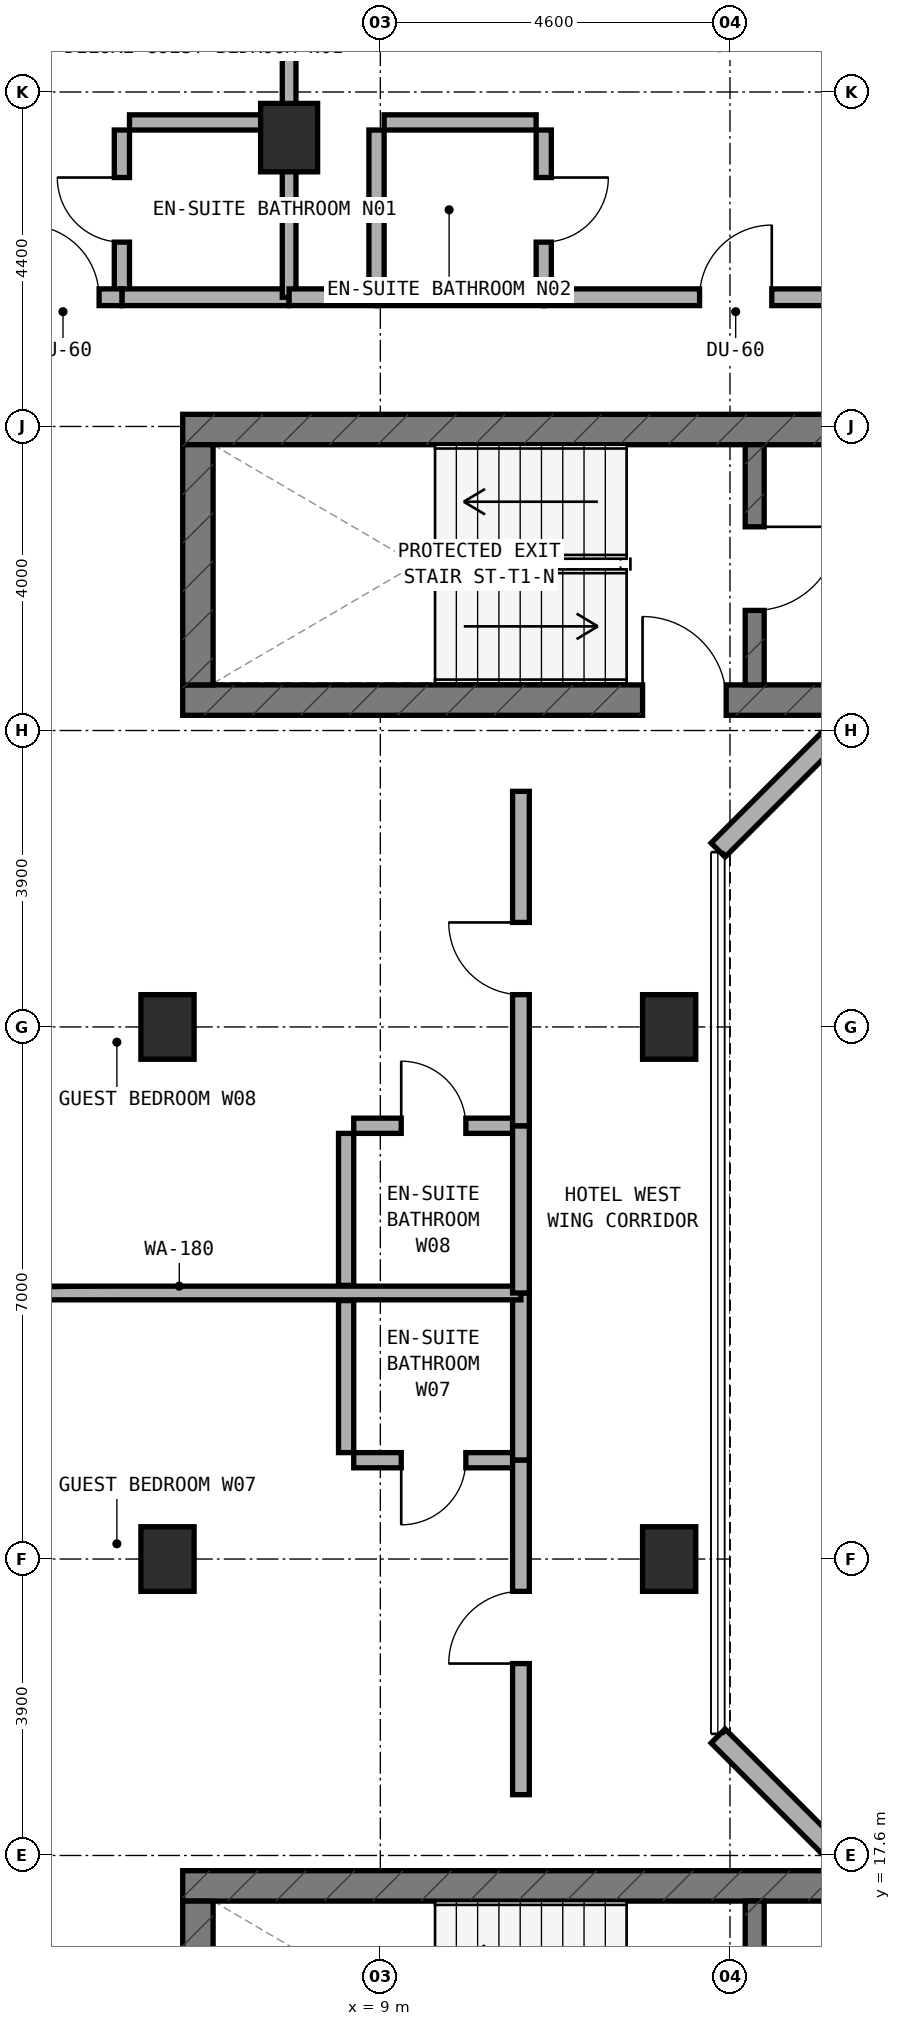
"""IFC4 building model, lengths in metres.
Left out: names, types, materials, properties, quantities, classifications, styles, units other than length and angle.
Written with IfcOpenShell. Run it as: python <this file> out.ifc"""

import sys

from ifc_helpers import new_model, si_unit, direction, frame, frame_2d, origin, origin_2d, place, context, subcontext, project, spatial, rectangle, extrude, element, fill, save


model = new_model("IFC4")
c1 = context("Model", 3, precision=1e-05, world=origin(), true_north=direction((0.0, 1.0)))
c2 = subcontext(c1, "Body", "Model", "MODEL_VIEW")
j1 = project(units=[si_unit("LENGTHUNIT", "METRE"), si_unit("PLANEANGLEUNIT", "RADIAN")], contexts=[c1])
p1 = place(None, origin())
s1 = spatial("IfcSite", under=j1, at=p1, CompositionType="ELEMENT")
p2 = place(p1, origin())
s2 = spatial("IfcBuilding", under=s1, at=p2, CompositionType="ELEMENT")
p3 = place(p2, frame((0.0, 0.0, 220.7)))
s3 = spatial("IfcBuildingStorey", under=s2, at=p3, CompositionType="ELEMENT", Elevation=220.7)
p4 = place(p3, frame((6.4, 32.8, 0.0), z_axis=(0.0, 0.0, 1.0), x_axis=(1.0, 0.0, 0.0)))
e1 = element("IfcWall", 1, at=p4, inside=s3, PredefinedType="SHEAR", context=c2, shape_type="SweptSolid", body=[
    extrude(rectangle(XDim=24.4, YDim=0.4, at=frame_2d((12.2, 0.0))), origin(), (0.0, 0.0, 1.0), 3.6),
])
p5 = place(p4, frame((6.05, 0.0, 0.0)))
e2 = element("IfcOpeningElement", 2, at=p5, cuts=e1, PredefinedType="OPENING", context=c2, shape_type="SweptSolid", body=[
    extrude(rectangle(XDim=1.1, YDim=2.15, at=frame_2d((0.55, 1.075))), frame((0.0, 0.21, 0.0), z_axis=(0.0, -1.0, 0.0), x_axis=(1.0, 0.0, 0.0)), (0.0, 0.0, 1.0), 0.42),
])
p6 = place(p3, frame((6.4, 36.36, 0.0), z_axis=(0.0, 0.0, 1.0), x_axis=(1.0, 0.0, 0.0)))
e3 = element("IfcWall", 3, at=p6, inside=s3, PredefinedType="SHEAR", context=c2, shape_type="SweptSolid", body=[
    extrude(rectangle(XDim=24.4, YDim=0.4, at=frame_2d((12.2, 0.0))), origin(), (0.0, 0.0, 1.0), 3.6),
])
p7 = place(p6, frame((9.15, 0.0, 0.0)))
e4 = element("IfcOpeningElement", 4, at=p7, cuts=e3, PredefinedType="OPENING", context=c2, shape_type="SweptSolid", body=[
    extrude(rectangle(XDim=1.2, YDim=2.15, at=frame_2d((0.6, 1.075))), frame((0.0, 0.21, 0.0), z_axis=(0.0, -1.0, 0.0), x_axis=(1.0, 0.0, 0.0)), (0.0, 0.0, 1.0), 0.42),
])
p8 = place(p6, frame((19.2, 0.0, 0.0)))
e5 = element("IfcOpeningElement", 5, at=p8, cuts=e3, PredefinedType="OPENING", context=c2, shape_type="SweptSolid", body=[
    extrude(rectangle(XDim=0.85, YDim=2.1, at=frame_2d((0.425, 1.05))), frame((0.0, 0.21, 0.0), z_axis=(0.0, -1.0, 0.0), x_axis=(1.0, 0.0, 0.0)), (0.0, 0.0, 1.0), 0.42),
])
p9 = place(p6, frame((16.94, 0.0, 0.0)))
e6 = element("IfcOpeningElement", 6, at=p9, cuts=e3, PredefinedType="OPENING", context=c2, shape_type="SweptSolid", body=[
    extrude(rectangle(XDim=0.85, YDim=2.1, at=frame_2d((0.425, 1.05))), frame((0.0, 0.21, 0.0), z_axis=(0.0, -1.0, 0.0), x_axis=(1.0, 0.0, 0.0)), (0.0, 0.0, 1.0), 0.42),
])
p10 = place(p3, frame((6.6, 33.0, 0.0), z_axis=(0.0, 0.0, 1.0), x_axis=(0.0, 1.0, 0.0)))
e7 = element("IfcWall", 7, at=p10, inside=s3, PredefinedType="SHEAR", context=c2, shape_type="SweptSolid", body=[
    extrude(rectangle(XDim=3.16, YDim=0.4, at=frame_2d((1.58, 0.0))), origin(), (0.0, 0.0, 1.0), 3.6),
])
p11 = place(p3, frame((13.925, 33.0, 0.0), z_axis=(0.0, 0.0, 1.0), x_axis=(0.0, 1.0, 0.0)))
e8 = element("IfcWall", 8, at=p11, inside=s3, PredefinedType="STANDARD", context=c2, shape_type="SweptSolid", body=[
    extrude(rectangle(XDim=3.16, YDim=0.25, at=frame_2d((1.58, 0.0))), origin(), (0.0, 0.0, 1.0), 3.32),
])
p12 = place(p11, frame((0.98, 0.0, 0.0)))
e9 = element("IfcOpeningElement", 9, at=p12, cuts=e8, PredefinedType="OPENING", context=c2, shape_type="SweptSolid", body=[
    extrude(rectangle(XDim=1.1, YDim=2.15, at=frame_2d((0.55, 1.075))), frame((0.0, 0.135, 0.0), z_axis=(0.0, -1.0, 0.0), x_axis=(1.0, 0.0, 0.0)), (0.0, 0.0, 1.0), 0.27),
])
p13 = place(p3, frame((6.4, 17.2, 0.0), z_axis=(0.0, 0.0, 1.0), x_axis=(1.0, 0.0, 0.0)))
e10 = element("IfcWall", 10, at=p13, inside=s3, PredefinedType="SHEAR", context=c2, shape_type="SweptSolid", body=[
    extrude(rectangle(XDim=24.4, YDim=0.4, at=frame_2d((12.2, 0.0))), origin(), (0.0, 0.0, 1.0), 3.6),
])
p14 = place(p3, frame((6.6, 13.84, 0.0), z_axis=(0.0, 0.0, 1.0), x_axis=(0.0, 1.0, 0.0)))
e11 = element("IfcWall", 11, at=p14, inside=s3, PredefinedType="SHEAR", context=c2, shape_type="SweptSolid", body=[
    extrude(rectangle(XDim=3.16, YDim=0.4, at=frame_2d((1.58, 0.0))), origin(), (0.0, 0.0, 1.0), 3.6),
])
p15 = place(p3, frame((13.925, 13.84, 0.0), z_axis=(0.0, 0.0, 1.0), x_axis=(0.0, 1.0, 0.0)))
e12 = element("IfcWall", 12, at=p15, inside=s3, PredefinedType="STANDARD", context=c2, shape_type="SweptSolid", body=[
    extrude(rectangle(XDim=3.16, YDim=0.25, at=frame_2d((1.58, 0.0))), origin(), (0.0, 0.0, 1.0), 3.32),
])
p16 = place(p15, frame((0.98, 0.0, 0.0)))
e13 = element("IfcOpeningElement", 13, at=p16, cuts=e12, PredefinedType="OPENING", context=c2, shape_type="SweptSolid", body=[
    extrude(rectangle(XDim=1.1, YDim=2.15, at=frame_2d((0.55, 1.075))), frame((0.0, 0.135, 0.0), z_axis=(0.0, -1.0, 0.0), x_axis=(1.0, 0.0, 0.0)), (0.0, 0.0, 1.0), 0.27),
])
for number, where, z_axis, x_axis in (
    (14, (6.2, 21.5, 0.0), (0.0, 0.0, 1.0), (1.0, 0.0, 0.0)),
    (15, (6.2, 28.5, 0.0), (0.0, 0.0, 1.0), (1.0, 0.0, 0.0)),
):
    element("IfcColumn", number, at=place(p3, frame(where, z_axis=z_axis, x_axis=x_axis)), inside=s3, PredefinedType="COLUMN", context=c2, shape_type="SweptSolid", body=[
        extrude(rectangle(XDim=0.7, YDim=0.85, at=origin_2d()), origin(), (0.0, 0.0, 1.0), 3.6),
    ])
p17 = place(p3, frame((7.8, 40.2, 0.0), z_axis=(0.0, 0.0, 1.0), x_axis=(1.0, 0.0, 0.0)))
e16 = element("IfcColumn", 16, at=p17, inside=s3, PredefinedType="COLUMN", context=c2, shape_type="SweptSolid", body=[
    extrude(rectangle(XDim=0.75, YDim=0.9, at=origin_2d()), origin(), (0.0, 0.0, 1.0), 3.6),
])
for number, where, z_axis, x_axis in (
    (17, (12.8, 21.5, 0.0), (0.0, 0.0, 1.0), (1.0, 0.0, 0.0)),
    (18, (12.8, 28.5, 0.0), (0.0, 0.0, 1.0), (1.0, 0.0, 0.0)),
):
    element("IfcColumn", number, at=place(p3, frame(where, z_axis=z_axis, x_axis=x_axis)), inside=s3, PredefinedType="COLUMN", context=c2, shape_type="SweptSolid", body=[
        extrude(rectangle(XDim=0.7, YDim=0.85, at=origin_2d()), origin(), (0.0, 0.0, 1.0), 3.6),
    ])
for number, where, z_axis, x_axis in (
    (19, (15.278, 32.662, 0.0), (0.0, 0.0, 1.0), (-0.707, -0.707, 0.0)),
    (20, (13.444, 19.172, 0.0), (0.0, 0.0, 1.0), (0.707, -0.707, 0.0)),
):
    element("IfcWall", number, at=place(p3, frame(where, z_axis=z_axis, x_axis=x_axis)), inside=s3, PredefinedType="STANDARD", context=c2, shape_type="SweptSolid", body=[
        extrude(rectangle(XDim=2.594, YDim=0.26, at=frame_2d((1.297, 0.0))), origin(), (0.0, 0.0, 1.0), 3.32),
    ])
p18 = place(p3, frame((5.6, 38.2, 0.0), z_axis=(0.0, 0.0, 1.0), x_axis=(0.0, 1.0, 0.0)))
e21 = element("IfcWall", 21, at=p18, inside=s3, PredefinedType="PLUMBINGWALL", context=c2, shape_type="SweptSolid", body=[
    extrude(rectangle(XDim=2.1, YDim=0.2, at=frame_2d((1.05, 0.0))), origin(), (0.0, 0.0, 1.0), 3.32),
])
p19 = place(p18, frame((0.625, 0.0, 0.0)))
e22 = element("IfcOpeningElement", 22, at=p19, cuts=e21, PredefinedType="OPENING", context=c2, shape_type="SweptSolid", body=[
    extrude(rectangle(XDim=0.85, YDim=2.1, at=frame_2d((0.425, 1.05))), frame((0.0, 0.11, 0.0), z_axis=(0.0, -1.0, 0.0), x_axis=(1.0, 0.0, 0.0)), (0.0, 0.0, 1.0), 0.22),
])
p20 = place(p3, frame((5.7, 40.4, 0.0), z_axis=(0.0, 0.0, 1.0), x_axis=(1.0, 0.0, 0.0)))
e23 = element("IfcWall", 23, at=p20, inside=s3, PredefinedType="PLUMBINGWALL", context=c2, shape_type="SweptSolid", body=[
    extrude(rectangle(XDim=2.0, YDim=0.2, at=frame_2d((1.0, 0.0))), origin(), (0.0, 0.0, 1.0), 3.32),
])
p21 = place(p3, frame((5.6, 38.1, 0.0), z_axis=(0.0, 0.0, 1.0), x_axis=(1.0, 0.0, 0.0)))
e24 = element("IfcWall", 24, at=p21, inside=s3, PredefinedType="SOLIDWALL", context=c2, shape_type="SweptSolid", body=[
    extrude(rectangle(XDim=2.2, YDim=0.22, at=frame_2d((1.1, 0.0))), origin(), (0.0, 0.0, 1.0), 2.695),
])
p22 = place(p3, frame((1.96, 38.1, 0.0), z_axis=(0.0, 0.0, 1.0), x_axis=(1.0, 0.0, 0.0)))
e25 = element("IfcWall", 25, at=p22, inside=s3, PredefinedType="SOLIDWALL", context=c2, shape_type="SweptSolid", body=[
    extrude(rectangle(XDim=3.64, YDim=0.22, at=frame_2d((1.82, 0.0))), origin(), (0.0, 0.0, 1.0), 3.32),
])
p23 = place(p22, frame((2.39, 0.0, 0.0)))
e26 = element("IfcOpeningElement", 26, at=p23, cuts=e25, PredefinedType="OPENING", context=c2, shape_type="SweptSolid", body=[
    extrude(rectangle(XDim=0.95, YDim=2.1, at=frame_2d((0.475, 1.05))), frame((0.0, 0.12, 0.0), z_axis=(0.0, -1.0, 0.0), x_axis=(1.0, 0.0, 0.0)), (0.0, 0.0, 1.0), 0.24),
])
p24 = place(p3, frame((7.8, 38.1, 0.0), z_axis=(0.0, 0.0, 1.0), x_axis=(0.0, 1.0, 0.0)))
e27 = element("IfcWall", 27, at=p24, inside=s3, PredefinedType="SOLIDWALL", context=c2, shape_type="SweptSolid", body=[
    extrude(rectangle(XDim=4.558, YDim=0.18, at=frame_2d((2.279, 0.0))), origin(), (0.0, 0.0, 1.0), 2.695),
])
p25 = place(p3, frame((11.15, 38.2, 0.0), z_axis=(0.0, 0.0, 1.0), x_axis=(0.0, 1.0, 0.0)))
e28 = element("IfcWall", 28, at=p25, inside=s3, PredefinedType="PLUMBINGWALL", context=c2, shape_type="SweptSolid", body=[
    extrude(rectangle(XDim=2.1, YDim=0.2, at=frame_2d((1.05, 0.0))), origin(), (0.0, 0.0, 1.0), 3.015),
])
p26 = place(p25, frame((0.625, 0.0, 0.0)))
e29 = element("IfcOpeningElement", 29, at=p26, cuts=e28, PredefinedType="OPENING", context=c2, shape_type="SweptSolid", body=[
    extrude(rectangle(XDim=0.85, YDim=2.1, at=frame_2d((0.425, 1.05))), frame((0.0, 0.11, 0.0), z_axis=(0.0, -1.0, 0.0), x_axis=(1.0, 0.0, 0.0)), (0.0, 0.0, 1.0), 0.22),
])
p27 = place(p3, frame((9.05, 40.4, 0.0), z_axis=(0.0, 0.0, 1.0), x_axis=(1.0, 0.0, 0.0)))
e30 = element("IfcWall", 30, at=p27, inside=s3, PredefinedType="PLUMBINGWALL", context=c2, shape_type="SweptSolid", body=[
    extrude(rectangle(XDim=2.0, YDim=0.2, at=frame_2d((1.0, 0.0))), origin(), (0.0, 0.0, 1.0), 3.015),
])
p28 = place(p3, frame((8.95, 38.2, 0.0), z_axis=(0.0, 0.0, 1.0), x_axis=(0.0, 1.0, 0.0)))
e31 = element("IfcWall", 31, at=p28, inside=s3, PredefinedType="PLUMBINGWALL", context=c2, shape_type="SweptSolid", body=[
    extrude(rectangle(XDim=2.1, YDim=0.2, at=frame_2d((1.05, 0.0))), origin(), (0.0, 0.0, 1.0), 3.015),
])
p29 = place(p3, frame((7.8, 38.1, 0.0), z_axis=(0.0, 0.0, 1.0), x_axis=(1.0, 0.0, 0.0)))
e32 = element("IfcWall", 32, at=p29, inside=s3, PredefinedType="SOLIDWALL", context=c2, shape_type="SweptSolid", body=[
    extrude(rectangle(XDim=1.15, YDim=0.22, at=frame_2d((0.575, 0.0))), origin(), (0.0, 0.0, 1.0), 2.695),
])
p30 = place(p3, frame((8.95, 38.1, 0.0), z_axis=(0.0, 0.0, 1.0), x_axis=(1.0, 0.0, 0.0)))
e33 = element("IfcWall", 33, at=p30, inside=s3, PredefinedType="SOLIDWALL", context=c2, shape_type="SweptSolid", body=[
    extrude(rectangle(XDim=2.2, YDim=0.22, at=frame_2d((1.1, 0.0))), origin(), (0.0, 0.0, 1.0), 3.32),
])
p31 = place(p3, frame((11.15, 38.1, 0.0), z_axis=(0.0, 0.0, 1.0), x_axis=(1.0, 0.0, 0.0)))
e34 = element("IfcWall", 34, at=p31, inside=s3, PredefinedType="SOLIDWALL", context=c2, shape_type="SweptSolid", body=[
    extrude(rectangle(XDim=5.05, YDim=0.22, at=frame_2d((2.525, 0.0))), origin(), (0.0, 0.0, 1.0), 2.695),
])
p32 = place(p31, frame((2.05, 0.0, 0.0)))
e35 = element("IfcOpeningElement", 35, at=p32, cuts=e34, PredefinedType="OPENING", context=c2, shape_type="SweptSolid", body=[
    extrude(rectangle(XDim=0.95, YDim=2.1, at=frame_2d((0.475, 1.05))), frame((0.0, 0.12, 0.0), z_axis=(0.0, -1.0, 0.0), x_axis=(1.0, 0.0, 0.0)), (0.0, 0.0, 1.0), 0.24),
])
p33 = place(p3, frame((8.65, 22.8, 0.0), z_axis=(0.0, 0.0, 1.0), x_axis=(1.0, 0.0, 0.0)))
e36 = element("IfcWall", 36, at=p33, inside=s3, PredefinedType="PLUMBINGWALL", context=c2, shape_type="SweptSolid", body=[
    extrude(rectangle(XDim=2.1, YDim=0.2, at=frame_2d((1.05, 0.0))), origin(), (0.0, 0.0, 1.0), 3.32),
])
p34 = place(p33, frame((0.625, 0.0, 0.0)))
e37 = element("IfcOpeningElement", 37, at=p34, cuts=e36, PredefinedType="OPENING", context=c2, shape_type="SweptSolid", body=[
    extrude(rectangle(XDim=0.85, YDim=2.1, at=frame_2d((0.425, 1.05))), frame((0.0, 0.11, 0.0), z_axis=(0.0, -1.0, 0.0), x_axis=(1.0, 0.0, 0.0)), (0.0, 0.0, 1.0), 0.22),
])
p35 = place(p3, frame((8.55, 22.9, 0.0), z_axis=(0.0, 0.0, 1.0), x_axis=(0.0, 1.0, 0.0)))
e38 = element("IfcWall", 38, at=p35, inside=s3, PredefinedType="PLUMBINGWALL", context=c2, shape_type="SweptSolid", body=[
    extrude(rectangle(XDim=2.0, YDim=0.2, at=frame_2d((1.0, 0.0))), origin(), (0.0, 0.0, 1.0), 3.32),
])
p36 = place(p3, frame((10.85, 22.8, 0.0), z_axis=(0.0, 0.0, 1.0), x_axis=(0.0, 1.0, 0.0)))
e39 = element("IfcWall", 39, at=p36, inside=s3, PredefinedType="SOLIDWALL", context=c2, shape_type="SweptSolid", body=[
    extrude(rectangle(XDim=2.2, YDim=0.22, at=frame_2d((1.1, 0.0))), origin(), (0.0, 0.0, 1.0), 3.32),
])
p37 = place(p3, frame((10.85, 18.4, 0.0), z_axis=(0.0, 0.0, 1.0), x_axis=(0.0, 1.0, 0.0)))
e40 = element("IfcWall", 40, at=p37, inside=s3, PredefinedType="SOLIDWALL", context=c2, shape_type="SweptSolid", body=[
    extrude(rectangle(XDim=4.4, YDim=0.22, at=frame_2d((2.2, 0.0))), origin(), (0.0, 0.0, 1.0), 2.695),
])
p38 = place(p37, frame((1.725, 0.0, 0.0)))
e41 = element("IfcOpeningElement", 41, at=p38, cuts=e40, PredefinedType="OPENING", context=c2, shape_type="SweptSolid", body=[
    extrude(rectangle(XDim=0.95, YDim=2.1, at=frame_2d((0.475, 1.05))), frame((0.0, 0.12, 0.0), z_axis=(0.0, -1.0, 0.0), x_axis=(1.0, 0.0, 0.0)), (0.0, 0.0, 1.0), 0.24),
])
p39 = place(p3, frame((1.86, 25.0, 0.0), z_axis=(0.0, 0.0, 1.0), x_axis=(1.0, 0.0, 0.0)))
e42 = element("IfcWall", 42, at=p39, inside=s3, PredefinedType="SOLIDWALL", context=c2, shape_type="SweptSolid", body=[
    extrude(rectangle(XDim=8.99, YDim=0.18, at=frame_2d((4.495, 0.0))), origin(), (0.0, 0.0, 1.0), 3.015),
])
p40 = place(p3, frame((8.65, 27.2, 0.0), z_axis=(0.0, 0.0, 1.0), x_axis=(1.0, 0.0, 0.0)))
e43 = element("IfcWall", 43, at=p40, inside=s3, PredefinedType="PLUMBINGWALL", context=c2, shape_type="SweptSolid", body=[
    extrude(rectangle(XDim=2.1, YDim=0.2, at=frame_2d((1.05, 0.0))), origin(), (0.0, 0.0, 1.0), 3.32),
])
p41 = place(p40, frame((0.625, 0.0, 0.0)))
e44 = element("IfcOpeningElement", 44, at=p41, cuts=e43, PredefinedType="OPENING", context=c2, shape_type="SweptSolid", body=[
    extrude(rectangle(XDim=0.85, YDim=2.1, at=frame_2d((0.425, 1.05))), frame((0.0, 0.11, 0.0), z_axis=(0.0, -1.0, 0.0), x_axis=(1.0, 0.0, 0.0)), (0.0, 0.0, 1.0), 0.22),
])
p42 = place(p3, frame((8.55, 25.1, 0.0), z_axis=(0.0, 0.0, 1.0), x_axis=(0.0, 1.0, 0.0)))
e45 = element("IfcWall", 45, at=p42, inside=s3, PredefinedType="PLUMBINGWALL", context=c2, shape_type="SweptSolid", body=[
    extrude(rectangle(XDim=2.0, YDim=0.2, at=frame_2d((1.0, 0.0))), origin(), (0.0, 0.0, 1.0), 3.32),
])
p43 = place(p3, frame((10.85, 25.0, 0.0), z_axis=(0.0, 0.0, 1.0), x_axis=(0.0, 1.0, 0.0)))
e46 = element("IfcWall", 46, at=p43, inside=s3, PredefinedType="SOLIDWALL", context=c2, shape_type="SweptSolid", body=[
    extrude(rectangle(XDim=2.2, YDim=0.22, at=frame_2d((1.1, 0.0))), origin(), (0.0, 0.0, 1.0), 3.32),
])
p44 = place(p3, frame((10.85, 27.2, 0.0), z_axis=(0.0, 0.0, 1.0), x_axis=(0.0, 1.0, 0.0)))
e47 = element("IfcWall", 47, at=p44, inside=s3, PredefinedType="SOLIDWALL", context=c2, shape_type="SweptSolid", body=[
    extrude(rectangle(XDim=4.4, YDim=0.22, at=frame_2d((2.2, 0.0))), origin(), (0.0, 0.0, 1.0), 2.695),
])
p45 = place(p44, frame((1.725, 0.0, 0.0)))
e48 = element("IfcOpeningElement", 48, at=p45, cuts=e47, PredefinedType="OPENING", context=c2, shape_type="SweptSolid", body=[
    extrude(rectangle(XDim=0.95, YDim=2.1, at=frame_2d((0.475, 1.05))), frame((0.0, 0.12, 0.0), z_axis=(0.0, -1.0, 0.0), x_axis=(1.0, 0.0, 0.0)), (0.0, 0.0, 1.0), 0.24),
])
p46 = place(p12, frame((1.1, 0.0, 0.0), z_axis=(0.0, 0.0, 1.0), x_axis=(-1.0, 0.0, 0.0)))
e49 = element("IfcDoor", 49, at=p46, inside=s3, OperationType="SINGLE_SWING_LEFT", PredefinedType="DOOR", context=c2, shape_type="SweptSolid", body=[
    extrude(rectangle(XDim=1.1, YDim=2.15, at=frame_2d((0.55, 1.075))), frame((0.0, 0.025, 0.0), z_axis=(0.0, -1.0, 0.0), x_axis=(1.0, 0.0, 0.0)), (0.0, 0.0, 1.0), 0.05),
])
fill(e9, e49)
p47 = place(p5, origin())
e50 = element("IfcDoor", 50, at=p47, inside=s3, OperationType="SINGLE_SWING_LEFT", PredefinedType="DOOR", context=c2, shape_type="SweptSolid", body=[
    extrude(rectangle(XDim=1.1, YDim=2.15, at=frame_2d((0.55, 1.075))), frame((0.0, 0.025, 0.0), z_axis=(0.0, -1.0, 0.0), x_axis=(1.0, 0.0, 0.0)), (0.0, 0.0, 1.0), 0.05),
])
fill(e2, e50)
p48 = place(p19, origin())
e51 = element("IfcDoor", 51, at=p48, inside=s3, OperationType="SINGLE_SWING_RIGHT", PredefinedType="DOOR", context=c2, shape_type="SweptSolid", body=[
    extrude(rectangle(XDim=0.85, YDim=2.1, at=frame_2d((0.425, 1.05))), frame((0.0, 0.025, 0.0), z_axis=(0.0, -1.0, 0.0), x_axis=(1.0, 0.0, 0.0)), (0.0, 0.0, 1.0), 0.05),
])
fill(e22, e51)
p49 = place(p23, origin())
e52 = element("IfcDoor", 52, at=p49, inside=s3, OperationType="SINGLE_SWING_LEFT", PredefinedType="DOOR", context=c2, shape_type="SweptSolid", body=[
    extrude(rectangle(XDim=0.95, YDim=2.1, at=frame_2d((0.475, 1.05))), frame((0.0, 0.025, 0.0), z_axis=(0.0, -1.0, 0.0), x_axis=(1.0, 0.0, 0.0)), (0.0, 0.0, 1.0), 0.05),
])
fill(e26, e52)
p50 = place(p26, frame((0.85, 0.0, 0.0), z_axis=(0.0, 0.0, 1.0), x_axis=(-1.0, 0.0, 0.0)))
e53 = element("IfcDoor", 53, at=p50, inside=s3, OperationType="SINGLE_SWING_LEFT", PredefinedType="DOOR", context=c2, shape_type="SweptSolid", body=[
    extrude(rectangle(XDim=0.85, YDim=2.1, at=frame_2d((0.425, 1.05))), frame((0.0, 0.025, 0.0), z_axis=(0.0, -1.0, 0.0), x_axis=(1.0, 0.0, 0.0)), (0.0, 0.0, 1.0), 0.05),
])
fill(e29, e53)
p51 = place(p32, origin())
e54 = element("IfcDoor", 54, at=p51, inside=s3, OperationType="SINGLE_SWING_RIGHT", PredefinedType="DOOR", context=c2, shape_type="SweptSolid", body=[
    extrude(rectangle(XDim=0.95, YDim=2.1, at=frame_2d((0.475, 1.05))), frame((0.0, 0.025, 0.0), z_axis=(0.0, -1.0, 0.0), x_axis=(1.0, 0.0, 0.0)), (0.0, 0.0, 1.0), 0.05),
])
fill(e35, e54)
p52 = place(p34, frame((0.85, 0.0, 0.0), z_axis=(0.0, 0.0, 1.0), x_axis=(-1.0, 0.0, 0.0)))
e55 = element("IfcDoor", 55, at=p52, inside=s3, OperationType="SINGLE_SWING_RIGHT", PredefinedType="DOOR", context=c2, shape_type="SweptSolid", body=[
    extrude(rectangle(XDim=0.85, YDim=2.1, at=frame_2d((0.425, 1.05))), frame((0.0, 0.025, 0.0), z_axis=(0.0, -1.0, 0.0), x_axis=(1.0, 0.0, 0.0)), (0.0, 0.0, 1.0), 0.05),
])
fill(e37, e55)
p53 = place(p38, origin())
e56 = element("IfcDoor", 56, at=p53, inside=s3, OperationType="SINGLE_SWING_LEFT", PredefinedType="DOOR", context=c2, shape_type="SweptSolid", body=[
    extrude(rectangle(XDim=0.95, YDim=2.1, at=frame_2d((0.475, 1.05))), frame((0.0, 0.025, 0.0), z_axis=(0.0, -1.0, 0.0), x_axis=(1.0, 0.0, 0.0)), (0.0, 0.0, 1.0), 0.05),
])
fill(e41, e56)
p54 = place(p41, origin())
e57 = element("IfcDoor", 57, at=p54, inside=s3, OperationType="SINGLE_SWING_LEFT", PredefinedType="DOOR", context=c2, shape_type="SweptSolid", body=[
    extrude(rectangle(XDim=0.85, YDim=2.1, at=frame_2d((0.425, 1.05))), frame((0.0, 0.025, 0.0), z_axis=(0.0, -1.0, 0.0), x_axis=(1.0, 0.0, 0.0)), (0.0, 0.0, 1.0), 0.05),
])
fill(e44, e57)
p55 = place(p45, origin())
e58 = element("IfcDoor", 58, at=p55, inside=s3, OperationType="SINGLE_SWING_RIGHT", PredefinedType="DOOR", context=c2, shape_type="SweptSolid", body=[
    extrude(rectangle(XDim=0.95, YDim=2.1, at=frame_2d((0.475, 1.05))), frame((0.0, 0.025, 0.0), z_axis=(0.0, -1.0, 0.0), x_axis=(1.0, 0.0, 0.0)), (0.0, 0.0, 1.0), 0.05),
])
fill(e48, e58)
save(model, sys.argv[1])
